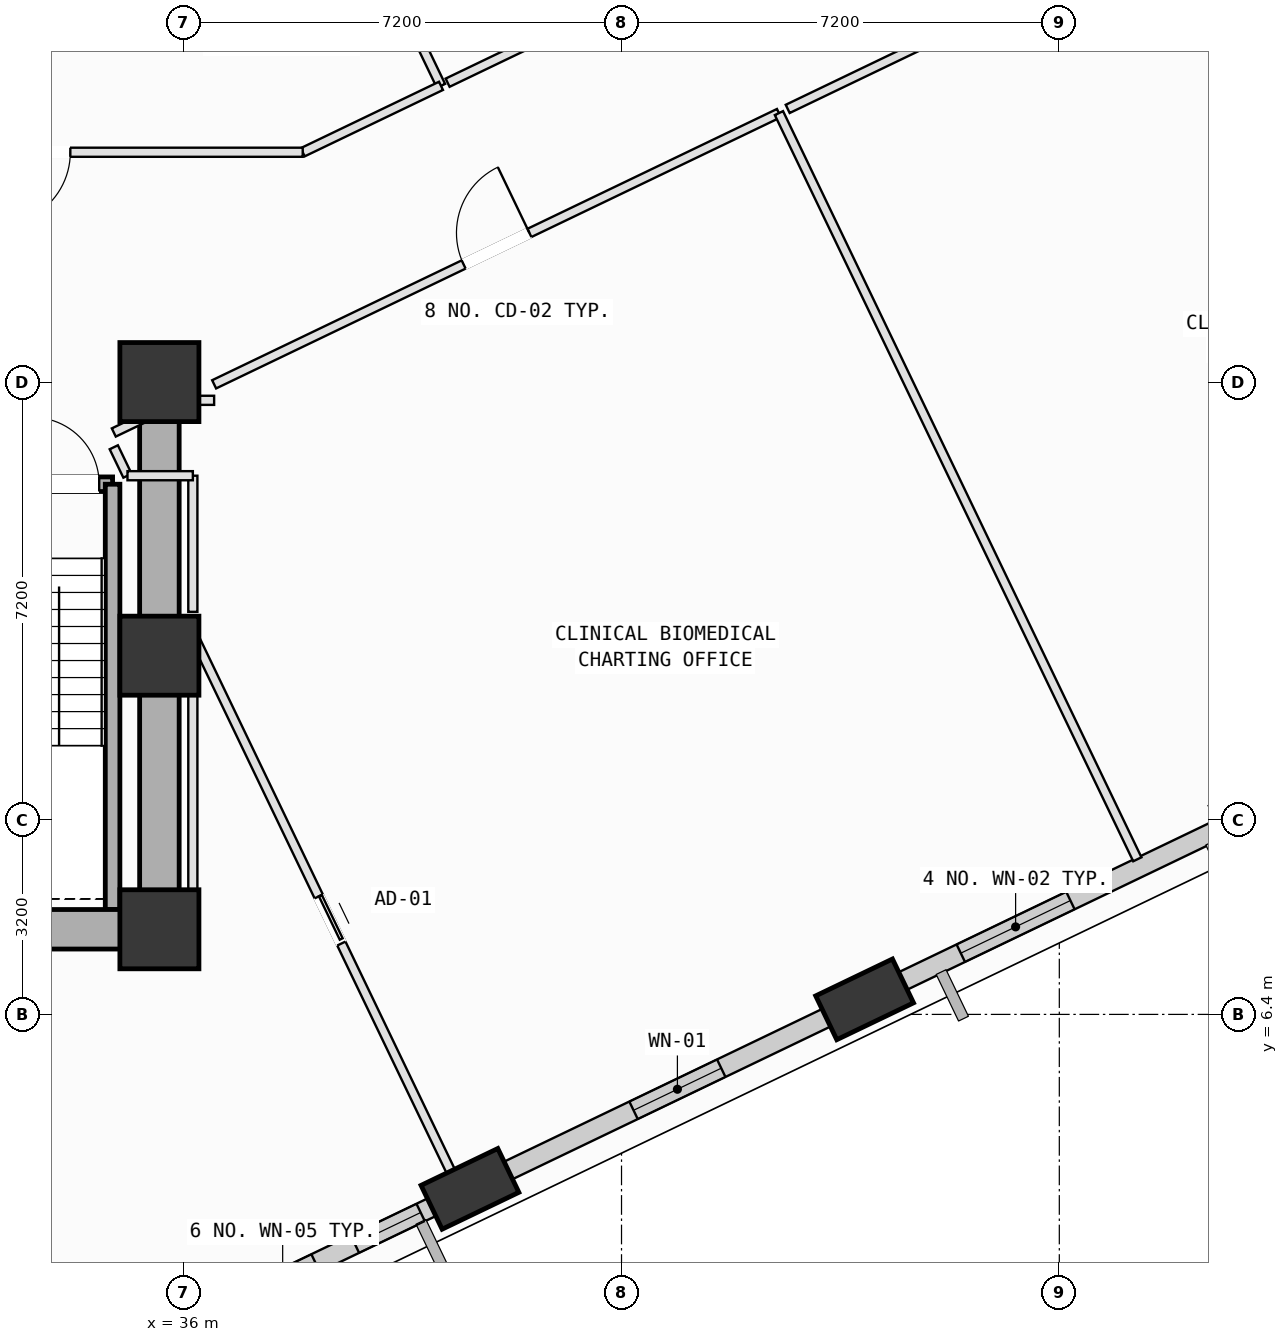
"""IFC4 building model, lengths in metres.
Left out: names, types, materials, properties, quantities, classifications, styles, units other than length and angle.
Written with IfcOpenShell. Run it as: python <this file> out.ifc"""

import sys

from ifc_helpers import new_model, si_unit, direction, frame, frame_2d, origin, origin_2d, place, context, subcontext, project, spatial, rectangle, extrude, element, fill, save


model = new_model("IFC4")
c1 = context("Model", 3, precision=1e-05, world=origin(), true_north=direction((0.0, 1.0)))
c2 = subcontext(c1, "Body", "Model", "MODEL_VIEW")
j1 = project(units=[si_unit("LENGTHUNIT", "METRE"), si_unit("PLANEANGLEUNIT", "RADIAN")], contexts=[c1])
p1 = place(None, origin())
s1 = spatial("IfcSite", under=j1, at=p1, CompositionType="ELEMENT")
p2 = place(p1, origin())
s2 = spatial("IfcBuilding", under=s1, at=p2, CompositionType="ELEMENT")
p3 = place(p2, frame((0.0, 0.0, 132.4)))
s3 = spatial("IfcBuildingStorey", under=s2, at=p3, CompositionType="ELEMENT", Elevation=132.4)
for number, where, z_axis, x_axis in (
    (1, (35.6, 7.8, 0.0), (0.0, 0.0, 1.0), (1.0, 0.0, 0.0)),
    (2, (35.6, 12.3, 0.0), (0.0, 0.0, 1.0), (1.0, 0.0, 0.0)),
    (3, (35.6, 16.8, 0.0), (0.0, 0.0, 1.0), (1.0, 0.0, 0.0)),
):
    element("IfcColumn", number, at=place(p3, frame(where, z_axis=z_axis, x_axis=x_axis)), inside=s3, PredefinedType="COLUMN", context=c2, shape_type="SweptSolid", body=[
        extrude(rectangle(XDim=1.3, YDim=1.3, at=origin_2d()), origin(), (0.0, 0.0, 1.0), 4.0),
    ])
p4 = place(p3, frame((40.708, 3.531, 0.002), z_axis=(0.087532631007, 0.030110251806, 0.995706488502), x_axis=(-0.700801184298, 0.712230390609, 0.040069574247)))
e4 = element("IfcColumn", 4, at=p4, inside=s3, PredefinedType="COLUMN", context=c2, shape_type="SweptSolid", body=[
    extrude(rectangle(XDim=1.4, YDim=0.8, at=origin_2d()), origin(), (0.0, 0.0, 1.0), 4.014),
])
p5 = place(p3, frame((47.198, 6.647, 0.002), z_axis=(0.074447409341, 0.056687079662, 0.99561245384), x_axis=(-0.888995895277, 0.456120203654, 0.040505036717)))
e5 = element("IfcColumn", 5, at=p5, inside=s3, PredefinedType="COLUMN", context=c2, shape_type="SweptSolid", body=[
    extrude(rectangle(XDim=1.4, YDim=0.8, at=origin_2d()), origin(), (0.0, 0.0, 1.0), 4.014),
])
p6 = place(p3, frame((40.427, 3.396, 0.0), z_axis=(0.0, 0.0, 1.0), x_axis=(-0.901447639929, -0.432888152374, 0.0)))
e6 = element("IfcWall", 6, at=p6, inside=s3, PredefinedType="SOLIDWALL", context=c2, shape_type="SweptSolid", body=[
    extrude(rectangle(XDim=6.215, YDim=0.32, at=frame_2d((3.107, 0.0))), origin(), (0.0, 0.0, 1.0), 3.165),
])
p7 = place(p6, frame((2.506, 0.0, 0.75)))
e7 = element("IfcOpeningElement", 7, at=p7, cuts=e6, PredefinedType="OPENING", context=c2, shape_type="SweptSolid", body=[
    extrude(rectangle(XDim=1.2, YDim=1.75, at=frame_2d((0.6, 0.875))), frame((0.0, 0.17, 0.0), z_axis=(0.0, -1.0, 0.0), x_axis=(1.0, 0.0, 0.0)), (0.0, 0.0, 1.0), 0.34),
])
p8 = place(p6, frame((0.588, 0.0, 0.75)))
e8 = element("IfcOpeningElement", 8, at=p8, cuts=e6, PredefinedType="OPENING", context=c2, shape_type="SweptSolid", body=[
    extrude(rectangle(XDim=1.2, YDim=1.75, at=frame_2d((0.6, 0.875))), frame((0.0, 0.17, 0.0), z_axis=(0.0, -1.0, 0.0), x_axis=(1.0, 0.0, 0.0)), (0.0, 0.0, 1.0), 0.34),
])
p9 = place(p3, frame((46.918, 6.513, 0.0), z_axis=(0.0, 0.0, 1.0), x_axis=(-0.901461687347, -0.432858898771, 0.0)))
e9 = element("IfcWall", 9, at=p9, inside=s3, PredefinedType="SOLIDWALL", context=c2, shape_type="SweptSolid", body=[
    extrude(rectangle(XDim=6.209, YDim=0.32, at=frame_2d((3.104, 0.0))), origin(), (0.0, 0.0, 1.0), 3.165),
])
p10 = place(p9, frame((2.305, 0.0, 0.75)))
e10 = element("IfcOpeningElement", 10, at=p10, cuts=e9, PredefinedType="OPENING", context=c2, shape_type="SweptSolid", body=[
    extrude(rectangle(XDim=1.6, YDim=1.95, at=frame_2d((0.8, 0.975))), frame((0.0, 0.17, 0.0), z_axis=(0.0, -1.0, 0.0), x_axis=(1.0, 0.0, 0.0)), (0.0, 0.0, 1.0), 0.34),
])
p11 = place(p3, frame((53.415, 9.633, 0.0), z_axis=(0.0, 0.0, 1.0), x_axis=(-0.901458716823, -0.43286508506, 0.0)))
e11 = element("IfcWall", 11, at=p11, inside=s3, PredefinedType="SOLIDWALL", context=c2, shape_type="SweptSolid", body=[
    extrude(rectangle(XDim=6.218, YDim=0.32, at=frame_2d((3.109, 0.0))), origin(), (0.0, 0.0, 1.0), 3.165),
])
p12 = place(p11, frame((3.142, 0.0, 0.75)))
e12 = element("IfcOpeningElement", 12, at=p12, cuts=e11, PredefinedType="OPENING", context=c2, shape_type="SweptSolid", body=[
    extrude(rectangle(XDim=2.0, YDim=1.95, at=frame_2d((1.0, 0.975))), frame((0.0, 0.17, 0.0), z_axis=(0.0, -1.0, 0.0), x_axis=(1.0, 0.0, 0.0)), (0.0, 0.0, 1.0), 0.34),
])
p13 = place(p3, frame((28.735, 20.966, 0.0), z_axis=(0.0, 0.0, 1.0), x_axis=(0.901457206076, 0.432868231237, 0.0)))
e13 = element("IfcWall", 13, at=p13, inside=s3, PredefinedType="SOLIDWALL", context=c2, shape_type="SweptSolid", body=[
    extrude(rectangle(XDim=5.96, YDim=0.32, at=frame_2d((2.98, 0.0))), origin(), (0.0, 0.0, 1.0), 2.965),
])
p14 = place(p3, frame((31.37, 15.12, 0.0), z_axis=(0.0, 0.0, 1.0), x_axis=(1.0, 0.0, 0.0)))
e14 = element("IfcWall", 14, at=p14, inside=s3, PredefinedType="SOLIDWALL", context=c2, shape_type="SweptSolid", body=[
    extrude(rectangle(XDim=3.46, YDim=0.24, at=frame_2d((1.73, 0.0))), origin(), (0.0, 0.0, 1.0), 3.78),
])
p15 = place(p14, frame((2.14, 0.0, 0.0)))
e15 = element("IfcOpeningElement", 15, at=p15, cuts=e14, PredefinedType="OPENING", context=c2, shape_type="SweptSolid", body=[
    extrude(rectangle(XDim=1.1, YDim=2.15, at=frame_2d((0.55, 1.075))), frame((0.0, 0.13, 0.0), z_axis=(0.0, -1.0, 0.0), x_axis=(1.0, 0.0, 0.0)), (0.0, 0.0, 1.0), 0.26),
])
p16 = place(p3, frame((34.83, 15.12, 0.0), z_axis=(0.0, 0.0, 1.0), x_axis=(0.0, -1.0, 0.0)))
e16 = element("IfcWall", 16, at=p16, inside=s3, PredefinedType="SOLIDWALL", context=c2, shape_type="SweptSolid", body=[
    extrude(rectangle(XDim=6.995, YDim=0.24, at=frame_2d((3.498, 0.0))), origin(), (0.0, 0.0, 1.0), 3.78),
])
p17 = place(p3, frame((24.8, 7.8, 0.0), z_axis=(0.0, 0.0, 1.0), x_axis=(1.0, 0.0, 0.0)))
e17 = element("IfcWall", 17, at=p17, inside=s3, PredefinedType="SHEAR", context=c2, shape_type="SweptSolid", body=[
    extrude(rectangle(XDim=10.8, YDim=0.65, at=frame_2d((5.4, 0.0))), origin(), (0.0, 0.0, 1.0), 3.78),
])
p18 = place(p3, frame((35.6, 7.8, 0.0), z_axis=(0.0, 0.0, 1.0), x_axis=(0.0, 1.0, 0.0)))
e18 = element("IfcWall", 18, at=p18, inside=s3, PredefinedType="SHEAR", context=c2, shape_type="SweptSolid", body=[
    extrude(rectangle(XDim=9.0, YDim=0.65, at=frame_2d((4.5, 0.0))), origin(), (0.0, 0.0, 1.0), 3.78),
])
p19 = place(p3, frame((36.15, 12.652, 0.0), z_axis=(0.0, 0.0, 1.0), x_axis=(0.432890931343, -0.901446305423, 0.0)))
e19 = element("IfcWall", 19, at=p19, inside=s3, PredefinedType="PARTITIONING", context=c2, shape_type="SweptSolid", body=[
    extrude(rectangle(XDim=10.426, YDim=0.15, at=frame_2d((5.213, 0.0))), origin(), (0.0, 0.0, 1.0), 3.78),
])
p20 = place(p19, frame((4.783, 0.0, 0.0)))
e20 = element("IfcOpeningElement", 20, at=p20, cuts=e19, PredefinedType="OPENING", context=c2, shape_type="SweptSolid", body=[
    extrude(rectangle(XDim=0.86, YDim=2.06, at=frame_2d((0.43, 1.03))), frame((0.0, 0.085, 0.0), z_axis=(0.0, -1.0, 0.0), x_axis=(1.0, 0.0, 0.0)), (0.0, 0.0, 1.0), 0.17),
])
p21 = place(p3, frame((35.6, 7.5, 0.0), z_axis=(0.0, 0.0, 1.0), x_axis=(1.0, 0.0, 0.0)))
e21 = element("IfcWall", 21, at=p21, inside=s3, PredefinedType="PARTITIONING", context=c2, shape_type="SweptSolid", body=[
    extrude(rectangle(XDim=0.55, YDim=0.15, at=frame_2d((0.275, 0.0))), origin(), (0.0, 0.0, 1.0), 2.965),
])
p22 = place(p3, frame((36.15, 7.5, 0.0), z_axis=(0.0, 0.0, 1.0), x_axis=(0.0, 1.0, 0.0)))
e22 = element("IfcWall", 22, at=p22, inside=s3, PredefinedType="PARTITIONING", context=c2, shape_type="SweptSolid", body=[
    extrude(rectangle(XDim=5.152, YDim=0.15, at=frame_2d((2.576, 0.0))), origin(), (0.0, 0.0, 1.0), 3.78),
])
p23 = place(p3, frame((35.075, 15.26, 0.0), z_axis=(0.0, 0.0, 1.0), x_axis=(-0.433052046358, 0.901368917339, 0.0)))
e23 = element("IfcWall", 23, at=p23, inside=s3, PredefinedType="PARTITIONING", context=c2, shape_type="SweptSolid", body=[
    extrude(rectangle(XDim=0.519, YDim=0.15, at=frame_2d((0.26, 0.0))), origin(), (0.0, 0.0, 1.0), 3.78),
])
p24 = place(p3, frame((34.85, 15.971, 0.0), z_axis=(0.0, 0.0, 1.0), x_axis=(0.901463825879, 0.432854445087, 0.0)))
e24 = element("IfcWall", 24, at=p24, inside=s3, PredefinedType="PARTITIONING", context=c2, shape_type="SweptSolid", body=[
    extrude(rectangle(XDim=1.222, YDim=0.15, at=frame_2d((0.611, 0.0))), origin(), (0.0, 0.0, 1.0), 2.945),
])
p25 = place(p3, frame((35.952, 16.5, 0.0), z_axis=(0.0, 0.0, 1.0), x_axis=(1.0, 0.0, 0.0)))
e25 = element("IfcWall", 25, at=p25, inside=s3, PredefinedType="PARTITIONING", context=c2, shape_type="SweptSolid", body=[
    extrude(rectangle(XDim=0.548, YDim=0.15, at=frame_2d((0.274, 0.0))), origin(), (0.0, 0.0, 1.0), 2.965),
])
p26 = place(p3, frame((36.5, 16.763, 0.0), z_axis=(0.0, 0.0, 1.0), x_axis=(0.901430980475, 0.432922842363, 0.0)))
e26 = element("IfcWall", 26, at=p26, inside=s3, PredefinedType="PARTITIONING", context=c2, shape_type="SweptSolid", body=[
    extrude(rectangle(XDim=10.305, YDim=0.15, at=frame_2d((5.152, 0.0))), origin(), (0.0, 0.0, 1.0), 2.965),
])
p27 = place(p26, frame((4.552, 0.0, 0.0)))
e27 = element("IfcOpeningElement", 27, at=p27, cuts=e26, PredefinedType="OPENING", context=c2, shape_type="SweptSolid", body=[
    extrude(rectangle(XDim=1.2, YDim=2.15, at=frame_2d((0.6, 1.075))), frame((0.0, 0.085, 0.0), z_axis=(0.0, -1.0, 0.0), x_axis=(1.0, 0.0, 0.0)), (0.0, 0.0, 1.0), 0.17),
])
p28 = place(p3, frame((45.789, 21.224, 0.0), z_axis=(0.0, 0.0, 1.0), x_axis=(0.43290477925, -0.901439655275, 0.0)))
e28 = element("IfcWall", 28, at=p28, inside=s3, PredefinedType="PARTITIONING", context=c2, shape_type="SweptSolid", body=[
    extrude(rectangle(XDim=13.615, YDim=0.15, at=frame_2d((6.808, 0.0))), origin(), (0.0, 0.0, 1.0), 3.78),
])
p29 = place(p3, frame((47.909, 6.734, 0.0), z_axis=(0.0, 0.0, 1.0), x_axis=(-0.901180159513, -0.433444714006, 0.0)))
e29 = element("IfcWall", 29, at=p29, inside=s3, PredefinedType="PARTITIONING", context=c2, shape_type="SweptSolid", body=[
    extrude(rectangle(XDim=0.99, YDim=0.15, at=frame_2d((0.495, 0.0))), origin(), (0.0, 0.0, 1.0), 3.165),
])
p30 = place(p3, frame((41.42, 3.618, 0.0), z_axis=(0.0, 0.0, 1.0), x_axis=(-0.901141896679, -0.433524257741, 0.0)))
e30 = element("IfcWall", 30, at=p30, inside=s3, PredefinedType="PARTITIONING", context=c2, shape_type="SweptSolid", body=[
    extrude(rectangle(XDim=0.68, YDim=0.15, at=frame_2d((0.34, 0.0))), origin(), (0.0, 0.0, 1.0), 3.165),
])
p31 = place(p3, frame((36.15, 13.021, 0.0), z_axis=(0.0, 0.0, 1.0), x_axis=(0.0, 1.0, 0.0)))
e31 = element("IfcWall", 31, at=p31, inside=s3, PredefinedType="PARTITIONING", context=c2, shape_type="SweptSolid", body=[
    extrude(rectangle(XDim=2.239, YDim=0.15, at=frame_2d((1.12, 0.0))), origin(), (0.0, 0.0, 1.0), 3.78),
])
p32 = place(p3, frame((36.15, 15.26, 0.0), z_axis=(0.0, 0.0, 1.0), x_axis=(-1.0, 0.0, 0.0)))
e32 = element("IfcWall", 32, at=p32, inside=s3, PredefinedType="PARTITIONING", context=c2, shape_type="SweptSolid", body=[
    extrude(rectangle(XDim=1.075, YDim=0.15, at=frame_2d((0.538, 0.0))), origin(), (0.0, 0.0, 1.0), 3.78),
])
p33 = place(p3, frame((45.933, 21.293, 0.0), z_axis=(0.0, 0.0, 1.0), x_axis=(0.901434334473, 0.432915858607, 0.0)))
e33 = element("IfcWall", 33, at=p33, inside=s3, PredefinedType="PARTITIONING", context=c2, shape_type="SweptSolid", body=[
    extrude(rectangle(XDim=12.24, YDim=0.15, at=frame_2d((6.12, 0.0))), origin(), (0.0, 0.0, 1.0), 3.78),
])
p34 = place(p33, frame((5.52, 0.0, 0.0)))
e34 = element("IfcOpeningElement", 34, at=p34, cuts=e33, PredefinedType="OPENING", context=c2, shape_type="SweptSolid", body=[
    extrude(rectangle(XDim=1.2, YDim=2.15, at=frame_2d((0.6, 1.075))), frame((0.0, 0.085, 0.0), z_axis=(0.0, -1.0, 0.0), x_axis=(1.0, 0.0, 0.0)), (0.0, 0.0, 1.0), 0.17),
])
p35 = place(p3, frame((28.538, 21.482, 0.0), z_axis=(0.0, 0.0, 1.0), x_axis=(0.901477867435, 0.432825200889, 0.0)))
e35 = element("IfcWall", 35, at=p35, inside=s3, PredefinedType="PARTITIONING", context=c2, shape_type="SweptSolid", body=[
    extrude(rectangle(XDim=10.624, YDim=0.15, at=frame_2d((5.312, 0.0))), origin(), (0.0, 0.0, 1.0), 3.78),
])
p36 = place(p3, frame((38.411, 25.463, 0.0), z_axis=(0.0, 0.0, 1.0), x_axis=(0.432827326229, -0.901476846996, 0.0)))
e36 = element("IfcWall", 36, at=p36, inside=s3, PredefinedType="PARTITIONING", context=c2, shape_type="SweptSolid", body=[
    extrude(rectangle(XDim=4.205, YDim=0.15, at=frame_2d((2.103, 0.0))), origin(), (0.0, 0.0, 1.0), 3.78),
])
p37 = place(p3, frame((40.231, 21.672, 0.0), z_axis=(0.0, 0.0, 1.0), x_axis=(-0.901436954351, -0.432910403351, 0.0)))
e37 = element("IfcWall", 37, at=p37, inside=s3, PredefinedType="PARTITIONING", context=c2, shape_type="SweptSolid", body=[
    extrude(rectangle(XDim=2.522, YDim=0.15, at=frame_2d((1.261, 0.0))), origin(), (0.0, 0.0, 1.0), 2.945),
])
p38 = place(p3, frame((37.957, 20.58, 0.0), z_axis=(0.0, 0.0, 1.0), x_axis=(-1.0, 0.0, 0.0)))
e38 = element("IfcWall", 38, at=p38, inside=s3, PredefinedType="PARTITIONING", context=c2, shape_type="SweptSolid", body=[
    extrude(rectangle(XDim=8.844, YDim=0.15, at=frame_2d((4.422, 0.0))), origin(), (0.0, 0.0, 1.0), 3.365),
])
p39 = place(p38, frame((3.822, 0.0, 0.0)))
e39 = element("IfcOpeningElement", 39, at=p39, cuts=e38, PredefinedType="OPENING", context=c2, shape_type="SweptSolid", body=[
    extrude(rectangle(XDim=1.2, YDim=2.15, at=frame_2d((0.6, 1.075))), frame((0.0, 0.085, 0.0), z_axis=(0.0, -1.0, 0.0), x_axis=(1.0, 0.0, 0.0)), (0.0, 0.0, 1.0), 0.17),
])
p40 = place(p3, frame((55.61, 29.058, 0.0), z_axis=(0.0, 0.0, 1.0), x_axis=(-0.901422279178, -0.432940959718, 0.0)))
e40 = element("IfcWall", 40, at=p40, inside=s3, PredefinedType="PARTITIONING", context=c2, shape_type="SweptSolid", body=[
    extrude(rectangle(XDim=16.94, YDim=0.15, at=frame_2d((8.47, 0.0))), origin(), (0.0, 0.0, 1.0), 2.945),
])
p41 = place(p40, frame((7.87, 0.0, 0.0)))
e41 = element("IfcOpeningElement", 41, at=p41, cuts=e40, PredefinedType="OPENING", context=c2, shape_type="SweptSolid", body=[
    extrude(rectangle(XDim=1.2, YDim=2.15, at=frame_2d((0.6, 1.075))), frame((0.0, 0.085, 0.0), z_axis=(0.0, -1.0, 0.0), x_axis=(1.0, 0.0, 0.0)), (0.0, 0.0, 1.0), 0.17),
])
p42 = place(p7, origin())
e42 = element("IfcWindow", 42, at=p42, inside=s3, PartitioningType="SINGLE_PANEL", PredefinedType="WINDOW", context=c2, shape_type="SweptSolid", body=[
    extrude(rectangle(XDim=1.2, YDim=1.75, at=frame_2d((0.6, 0.875))), frame((0.0, 0.03, 0.0), z_axis=(0.0, -1.0, 0.0), x_axis=(1.0, 0.0, 0.0)), (0.0, 0.0, 1.0), 0.06),
])
fill(e7, e42)
p43 = place(p8, origin())
e43 = element("IfcWindow", 43, at=p43, inside=s3, PartitioningType="SINGLE_PANEL", PredefinedType="WINDOW", context=c2, shape_type="SweptSolid", body=[
    extrude(rectangle(XDim=1.2, YDim=1.75, at=frame_2d((0.6, 0.875))), frame((0.0, 0.03, 0.0), z_axis=(0.0, -1.0, 0.0), x_axis=(1.0, 0.0, 0.0)), (0.0, 0.0, 1.0), 0.06),
])
fill(e8, e43)
p44 = place(p10, origin())
e44 = element("IfcWindow", 44, at=p44, inside=s3, PartitioningType="SINGLE_PANEL", PredefinedType="WINDOW", context=c2, shape_type="SweptSolid", body=[
    extrude(rectangle(XDim=1.6, YDim=1.95, at=frame_2d((0.8, 0.975))), frame((0.0, 0.03, 0.0), z_axis=(0.0, -1.0, 0.0), x_axis=(1.0, 0.0, 0.0)), (0.0, 0.0, 1.0), 0.06),
])
fill(e10, e44)
p45 = place(p12, origin())
e45 = element("IfcWindow", 45, at=p45, inside=s3, PartitioningType="SINGLE_PANEL", PredefinedType="WINDOW", context=c2, shape_type="SweptSolid", body=[
    extrude(rectangle(XDim=2.0, YDim=1.95, at=frame_2d((1.0, 0.975))), frame((0.0, 0.03, 0.0), z_axis=(0.0, -1.0, 0.0), x_axis=(1.0, 0.0, 0.0)), (0.0, 0.0, 1.0), 0.06),
])
fill(e12, e45)
p46 = place(p15, origin())
e46 = element("IfcDoor", 46, at=p46, inside=s3, OperationType="SINGLE_SWING_LEFT", PredefinedType="DOOR", context=c2, shape_type="SweptSolid", body=[
    extrude(rectangle(XDim=1.1, YDim=2.15, at=frame_2d((0.55, 1.075))), frame((0.0, 0.025, 0.0), z_axis=(0.0, -1.0, 0.0), x_axis=(1.0, 0.0, 0.0)), (0.0, 0.0, 1.0), 0.05),
])
fill(e15, e46)
p47 = place(p27, origin())
e47 = element("IfcDoor", 47, at=p47, inside=s3, OperationType="SINGLE_SWING_RIGHT", PredefinedType="DOOR", context=c2, shape_type="SweptSolid", body=[
    extrude(rectangle(XDim=1.2, YDim=2.15, at=frame_2d((0.6, 1.075))), frame((0.0, 0.025, 0.0), z_axis=(0.0, -1.0, 0.0), x_axis=(1.0, 0.0, 0.0)), (0.0, 0.0, 1.0), 0.05),
])
fill(e27, e47)
p48 = place(p39, origin())
e48 = element("IfcDoor", 48, at=p48, inside=s3, OperationType="SINGLE_SWING_RIGHT", PredefinedType="DOOR", context=c2, shape_type="SweptSolid", body=[
    extrude(rectangle(XDim=1.2, YDim=2.15, at=frame_2d((0.6, 1.075))), frame((0.0, 0.025, 0.0), z_axis=(0.0, -1.0, 0.0), x_axis=(1.0, 0.0, 0.0)), (0.0, 0.0, 1.0), 0.05),
])
fill(e39, e48)
p49 = place(p20, origin())
e49 = element("IfcDoor", 49, at=p49, inside=s3, OperationType="SLIDING_TO_LEFT", PredefinedType="DOOR", context=c2, shape_type="SweptSolid", body=[
    extrude(rectangle(XDim=0.86, YDim=2.06, at=frame_2d((0.43, 1.03))), frame((0.0, 0.025, 0.0), z_axis=(0.0, -1.0, 0.0), x_axis=(1.0, 0.0, 0.0)), (0.0, 0.0, 1.0), 0.05),
])
fill(e20, e49)
save(model, sys.argv[1])
